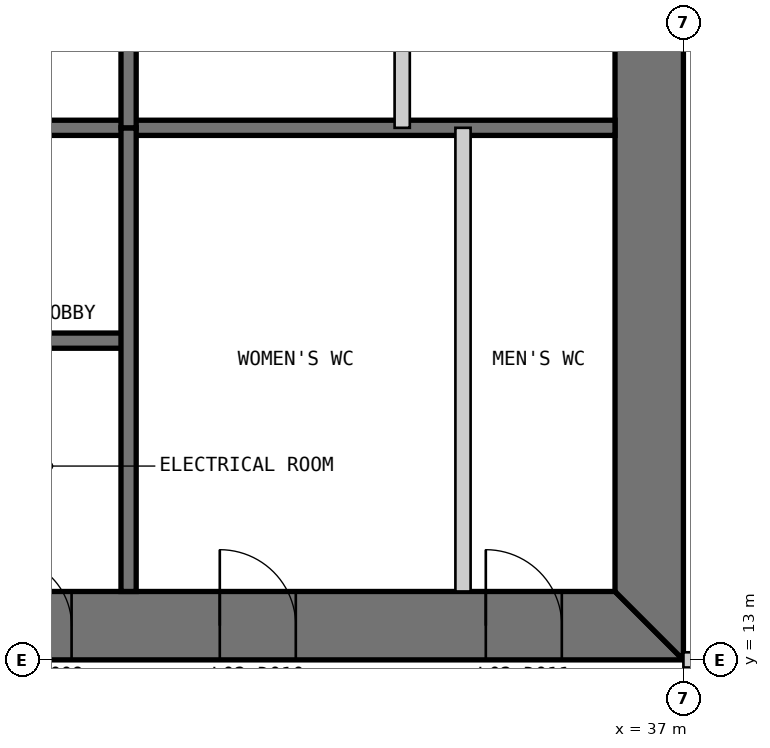
"""IFC4 building model, lengths in metres.
Left out: names, types, materials, properties, quantities, classifications, styles, units other than length and angle.
Written with IfcOpenShell. Run it as: python <this file> out.ifc"""

import sys

from ifc_helpers import new_model, si_unit, direction, frame, frame_2d, origin, place, context, subcontext, project, spatial, polyline, rectangle, outline, extrude, element, fill, save


model = new_model("IFC4")
c1 = context("Model", 3, precision=1e-05, world=origin(), true_north=direction((0.0, 1.0)))
c2 = subcontext(c1, "Body", "Model", "MODEL_VIEW")
j1 = project(units=[si_unit("LENGTHUNIT", "METRE"), si_unit("PLANEANGLEUNIT", "RADIAN")], contexts=[c1])
p1 = place(None, origin())
s1 = spatial("IfcSite", under=j1, at=p1, CompositionType="ELEMENT")
p2 = place(p1, origin())
s2 = spatial("IfcBuilding", under=s1, at=p2, CompositionType="ELEMENT")
p3 = place(p2, frame((0.0, 0.0, 11.8)))
s3 = spatial("IfcBuildingStorey", under=s2, at=p3, CompositionType="ELEMENT", Elevation=11.8)
p4 = place(p3, frame((13.0, 13.45, 0.0), z_axis=(0.0, 0.0, 1.0), x_axis=(1.0, 0.0, 0.0)))
e1 = element("IfcWall", 1, at=p4, inside=s3, PredefinedType="SHEAR", context=c2, shape_type="SweptSolid", body=[
    extrude(outline(polyline([(0.0, -0.45), (24.0, -0.45), (23.1, 0.45), (0.9, 0.45), (0.0, -0.45)])), origin(), (0.0, 0.0, 1.0), 4.8),
])
p5 = place(p4, frame((4.9, 0.0, 0.0)))
e2 = element("IfcOpeningElement", 2, at=p5, cuts=e1, PredefinedType="OPENING", context=c2, shape_type="SweptSolid", body=[
    extrude(rectangle(XDim=1.0, YDim=2.2, at=frame_2d((0.5, 1.1))), frame((0.0, 0.46, 0.0), z_axis=(0.0, -1.0, 0.0), x_axis=(1.0, 0.0, 0.0)), (0.0, 0.0, 1.0), 0.92),
])
p6 = place(p4, frame((8.9, 0.0, 0.0)))
e3 = element("IfcOpeningElement", 3, at=p6, cuts=e1, PredefinedType="OPENING", context=c2, shape_type="SweptSolid", body=[
    extrude(rectangle(XDim=1.1, YDim=2.2, at=frame_2d((0.55, 1.1))), frame((0.0, 0.46, 0.0), z_axis=(0.0, -1.0, 0.0), x_axis=(1.0, 0.0, 0.0)), (0.0, 0.0, 1.0), 0.92),
])
p7 = place(p4, frame((15.05, 0.0, 0.0)))
e4 = element("IfcOpeningElement", 4, at=p7, cuts=e1, PredefinedType="OPENING", context=c2, shape_type="SweptSolid", body=[
    extrude(rectangle(XDim=0.9, YDim=2.2, at=frame_2d((0.45, 1.1))), frame((0.0, 0.46, 0.0), z_axis=(0.0, -1.0, 0.0), x_axis=(1.0, 0.0, 0.0)), (0.0, 0.0, 1.0), 0.92),
])
p8 = place(p4, frame((17.9, 0.0, 0.0)))
e5 = element("IfcOpeningElement", 5, at=p8, cuts=e1, PredefinedType="OPENING", context=c2, shape_type="SweptSolid", body=[
    extrude(rectangle(XDim=1.0, YDim=2.2, at=frame_2d((0.5, 1.1))), frame((0.0, 0.46, 0.0), z_axis=(0.0, -1.0, 0.0), x_axis=(1.0, 0.0, 0.0)), (0.0, 0.0, 1.0), 0.92),
])
p9 = place(p4, frame((21.4, 0.0, 0.0)))
e6 = element("IfcOpeningElement", 6, at=p9, cuts=e1, PredefinedType="OPENING", context=c2, shape_type="SweptSolid", body=[
    extrude(rectangle(XDim=1.0, YDim=2.2, at=frame_2d((0.5, 1.1))), frame((0.0, 0.46, 0.0), z_axis=(0.0, -1.0, 0.0), x_axis=(1.0, 0.0, 0.0)), (0.0, 0.0, 1.0), 0.92),
])
p10 = place(p3, frame((36.55, 13.9, 0.0), z_axis=(0.0, 0.0, 1.0), x_axis=(0.0, 1.0, 0.0)))
e7 = element("IfcWall", 7, at=p10, inside=s3, PredefinedType="SHEAR", context=c2, shape_type="SweptSolid", body=[
    extrude(outline(polyline([(-0.9, -0.45), (23.1, -0.45), (22.2, 0.45), (0.0, 0.45), (-0.9, -0.45)])), origin(), (0.0, 0.0, 1.0), 4.8),
])
p11 = place(p10, frame((20.2, 0.0, 0.0)))
e8 = element("IfcOpeningElement", 8, at=p11, cuts=e7, PredefinedType="OPENING", context=c2, shape_type="SweptSolid", body=[
    extrude(rectangle(XDim=1.0, YDim=2.2, at=frame_2d((0.5, 1.1))), frame((0.0, 0.46, 0.0), z_axis=(0.0, -1.0, 0.0), x_axis=(1.0, 0.0, 0.0)), (0.0, 0.0, 1.0), 0.92),
])
p12 = place(p10, frame((17.25, 0.0, 0.0)))
e9 = element("IfcOpeningElement", 9, at=p12, cuts=e7, PredefinedType="OPENING", context=c2, shape_type="SweptSolid", body=[
    extrude(rectangle(XDim=0.9, YDim=2.2, at=frame_2d((0.45, 1.1))), frame((0.0, 0.46, 0.0), z_axis=(0.0, -1.0, 0.0), x_axis=(1.0, 0.0, 0.0)), (0.0, 0.0, 1.0), 0.92),
])
p13 = place(p3, frame((20.3, 17.2, 0.0), z_axis=(0.0, 0.0, 1.0), x_axis=(1.0, 0.0, 0.0)))
e10 = element("IfcWall", 10, at=p13, inside=s3, PredefinedType="SOLIDWALL", context=c2, shape_type="SweptSolid", body=[
    extrude(rectangle(XDim=9.4, YDim=0.2, at=frame_2d((4.7, 0.0))), origin(), (0.0, 0.0, 1.0), 4.6),
])
p14 = place(p13, frame((0.25, 0.0, 0.0)))
e11 = element("IfcOpeningElement", 11, at=p14, cuts=e10, PredefinedType="OPENING", context=c2, shape_type="SweptSolid", body=[
    extrude(rectangle(XDim=1.0, YDim=2.2, at=frame_2d((0.5, 1.1))), frame((0.0, 0.11, 0.0), z_axis=(0.0, -1.0, 0.0), x_axis=(1.0, 0.0, 0.0)), (0.0, 0.0, 1.0), 0.22),
])
p15 = place(p3, frame((20.3, 20.0, 0.0), z_axis=(0.0, 0.0, 1.0), x_axis=(1.0, 0.0, 0.0)))
e12 = element("IfcWall", 12, at=p15, inside=s3, PredefinedType="SOLIDWALL", context=c2, shape_type="SweptSolid", body=[
    extrude(rectangle(XDim=15.8, YDim=0.2, at=frame_2d((7.9, 0.0))), origin(), (0.0, 0.0, 1.0), 4.6),
])
p16 = place(p3, frame((29.7, 13.9, 0.0), z_axis=(0.0, 0.0, 1.0), x_axis=(0.0, 1.0, 0.0)))
e13 = element("IfcWall", 13, at=p16, inside=s3, PredefinedType="SOLIDWALL", context=c2, shape_type="SweptSolid", body=[
    extrude(rectangle(XDim=6.1, YDim=0.2, at=frame_2d((3.05, 0.0))), origin(), (0.0, 0.0, 1.0), 4.6),
])
p17 = place(p3, frame((34.1, 13.9, 0.0), z_axis=(0.0, 0.0, 1.0), x_axis=(0.0, 1.0, 0.0)))
e14 = element("IfcWall", 14, at=p17, inside=s3, PredefinedType="PARTITIONING", context=c2, shape_type="SweptSolid", body=[
    extrude(rectangle(XDim=6.1, YDim=0.2, at=frame_2d((3.05, 0.0))), origin(), (0.0, 0.0, 1.0), 4.6),
])
p18 = place(p3, frame((33.3, 36.1, 0.0), z_axis=(0.0, 0.0, 1.0), x_axis=(0.0, -1.0, 0.0)))
e15 = element("IfcWall", 15, at=p18, inside=s3, PredefinedType="PARTITIONING", context=c2, shape_type="SweptSolid", body=[
    extrude(rectangle(XDim=16.1, YDim=0.2, at=frame_2d((8.05, 0.0))), origin(), (0.0, 0.0, 1.0), 4.6),
])
p19 = place(p18, frame((3.8, 0.0, 0.0)))
e16 = element("IfcOpeningElement", 16, at=p19, cuts=e15, PredefinedType="OPENING", context=c2, shape_type="SweptSolid", body=[
    extrude(rectangle(XDim=0.9, YDim=2.2, at=frame_2d((0.45, 1.1))), frame((0.0, 0.11, 0.0), z_axis=(0.0, -1.0, 0.0), x_axis=(1.0, 0.0, 0.0)), (0.0, 0.0, 1.0), 0.22),
])
p20 = place(p3, frame((29.7, 36.1, 0.0), z_axis=(0.0, 0.0, 1.0), x_axis=(0.0, -1.0, 0.0)))
e17 = element("IfcWall", 17, at=p20, inside=s3, PredefinedType="SOLIDWALL", context=c2, shape_type="SweptSolid", body=[
    extrude(rectangle(XDim=16.1, YDim=0.2, at=frame_2d((8.05, 0.0))), origin(), (0.0, 0.0, 1.0), 4.6),
])
p21 = place(p3, frame((37.0, 13.0, 0.0), z_axis=(0.0, 0.0, 1.0), x_axis=(1.0, 0.0, 0.0)))
e18 = element("IfcWall", 18, at=p21, inside=s3, PredefinedType="PARTITIONING", context=c2, shape_type="SweptSolid", body=[
    extrude(rectangle(XDim=6.0, YDim=0.2, at=frame_2d((3.0, 0.0))), origin(), (0.0, 0.0, 1.0), 3.653),
])
p22 = place(p7, origin())
e19 = element("IfcDoor", 19, at=p22, inside=s3, OperationType="SINGLE_SWING_LEFT", PredefinedType="DOOR", context=c2, shape_type="SweptSolid", body=[
    extrude(rectangle(XDim=0.9, YDim=2.2, at=frame_2d((0.45, 1.1))), frame((0.0, 0.025, 0.0), z_axis=(0.0, -1.0, 0.0), x_axis=(1.0, 0.0, 0.0)), (0.0, 0.0, 1.0), 0.05),
    extrude(outline(polyline([(0.0, 0.0), (0.04, 0.0), (0.04, 2.16), (0.86, 2.16), (0.86, 0.0), (0.9, 0.0), (0.9, 2.2), (0.0, 2.2), (0.0, 0.0)])), frame((0.0, 0.3, 0.0), z_axis=(0.0, -1.0, 0.0), x_axis=(1.0, 0.0, 0.0)), (0.0, 0.0, 1.0), 0.6),
])
fill(e4, e19)
p23 = place(p8, origin())
e20 = element("IfcDoor", 20, at=p23, inside=s3, OperationType="SINGLE_SWING_LEFT", PredefinedType="DOOR", context=c2, shape_type="SweptSolid", body=[
    extrude(rectangle(XDim=1.0, YDim=2.2, at=frame_2d((0.5, 1.1))), frame((0.0, 0.025, 0.0), z_axis=(0.0, -1.0, 0.0), x_axis=(1.0, 0.0, 0.0)), (0.0, 0.0, 1.0), 0.05),
    extrude(outline(polyline([(0.0, 0.0), (0.04, 0.0), (0.04, 2.16), (0.96, 2.16), (0.96, 0.0), (1.0, 0.0), (1.0, 2.2), (0.0, 2.2), (0.0, 0.0)])), frame((0.0, 0.3, 0.0), z_axis=(0.0, -1.0, 0.0), x_axis=(1.0, 0.0, 0.0)), (0.0, 0.0, 1.0), 0.6),
])
fill(e5, e20)
p24 = place(p9, origin())
e21 = element("IfcDoor", 21, at=p24, inside=s3, OperationType="SINGLE_SWING_LEFT", PredefinedType="DOOR", context=c2, shape_type="SweptSolid", body=[
    extrude(rectangle(XDim=1.0, YDim=2.2, at=frame_2d((0.5, 1.1))), frame((0.0, 0.025, 0.0), z_axis=(0.0, -1.0, 0.0), x_axis=(1.0, 0.0, 0.0)), (0.0, 0.0, 1.0), 0.05),
    extrude(outline(polyline([(0.0, 0.0), (0.04, 0.0), (0.04, 2.16), (0.96, 2.16), (0.96, 0.0), (1.0, 0.0), (1.0, 2.2), (0.0, 2.2), (0.0, 0.0)])), frame((0.0, 0.3, 0.0), z_axis=(0.0, -1.0, 0.0), x_axis=(1.0, 0.0, 0.0)), (0.0, 0.0, 1.0), 0.6),
])
fill(e6, e21)
save(model, sys.argv[1])
